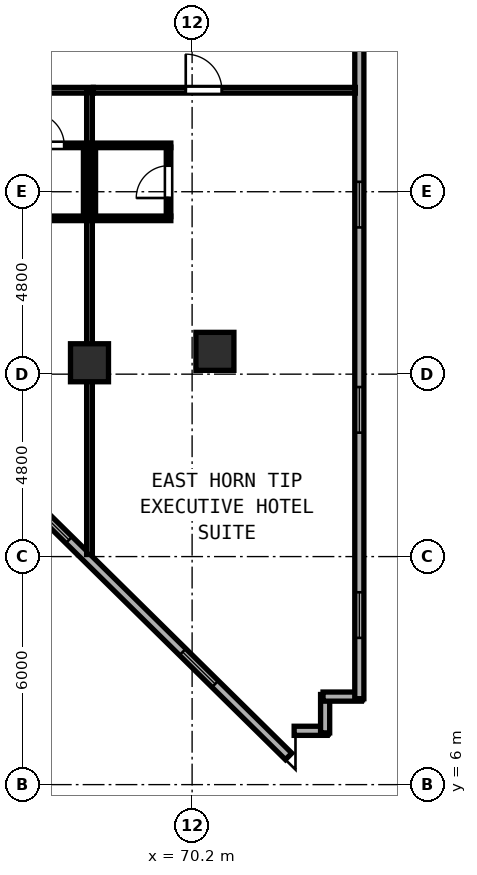
"""IFC4 building model, lengths in metres.
Left out: names, types, materials, properties, quantities, classifications, styles, units other than length and angle.
Written with IfcOpenShell. Run it as: python <this file> out.ifc"""

import sys

from ifc_helpers import new_model, si_unit, direction, frame, frame_2d, origin, origin_2d, place, context, subcontext, project, spatial, rectangle, hollow_rectangle, extrude, element, fill, save


model = new_model("IFC4")
c1 = context("Model", 3, precision=1e-05, world=origin(), true_north=direction((0.0, 1.0)))
c2 = subcontext(c1, "Body", "Model", "MODEL_VIEW")
j1 = project(units=[si_unit("LENGTHUNIT", "METRE"), si_unit("PLANEANGLEUNIT", "RADIAN")], contexts=[c1])
p1 = place(None, origin())
s1 = spatial("IfcSite", under=j1, at=p1, CompositionType="ELEMENT")
p2 = place(p1, origin())
s2 = spatial("IfcBuilding", under=s1, at=p2, CompositionType="ELEMENT")
p3 = place(p2, frame((0.0, 0.0, 47.6)))
s3 = spatial("IfcBuildingStorey", under=s2, at=p3, CompositionType="ELEMENT", Elevation=47.6)
for number, where, z_axis, x_axis in (
    (1, (70.8, 17.4, 0.0), (0.0, 0.0, 1.0), (1.0, 0.0, 0.0)),
    (2, (67.5, 17.1, 0.0), (0.0, 0.0, 1.0), (1.0, 0.0, 0.0)),
):
    element("IfcColumn", number, at=place(p3, frame(where, z_axis=z_axis, x_axis=x_axis)), inside=s3, PredefinedType="COLUMN", context=c2, shape_type="SweptSolid", body=[
        extrude(hollow_rectangle(XDim=1.0, YDim=1.0, WallThickness=0.038, at=origin_2d()), origin(), (0.0, 0.0, 1.0), 3.8),
    ])
p4 = place(p3, frame((64.966, 14.405, 0.0), z_axis=(0.0, 0.0, 1.0), x_axis=(0.71217720779, -0.701999732695, 0.0)))
e3 = element("IfcWall", 3, at=p4, inside=s3, PredefinedType="SOLIDWALL", context=c2, shape_type="SweptSolid", body=[
    extrude(rectangle(XDim=10.915, YDim=0.24, at=frame_2d((5.458, 0.0))), origin(), (0.0, 0.0, 1.0), 3.6),
])
p5 = place(p4, frame((1.6, 0.0, 0.85)))
e4 = element("IfcOpeningElement", 4, at=p5, cuts=e3, PredefinedType="OPENING", context=c2, shape_type="SweptSolid", body=[
    extrude(rectangle(XDim=1.2, YDim=1.85, at=frame_2d((0.6, 0.925))), frame((0.0, 0.13, 0.0), z_axis=(0.0, -1.0, 0.0), x_axis=(1.0, 0.0, 0.0)), (0.0, 0.0, 1.0), 0.26),
])
p6 = place(p4, frame((7.0, 0.0, 0.85)))
e5 = element("IfcOpeningElement", 5, at=p6, cuts=e3, PredefinedType="OPENING", context=c2, shape_type="SweptSolid", body=[
    extrude(rectangle(XDim=1.2, YDim=1.85, at=frame_2d((0.6, 0.925))), frame((0.0, 0.13, 0.0), z_axis=(0.0, -1.0, 0.0), x_axis=(1.0, 0.0, 0.0)), (0.0, 0.0, 1.0), 0.26),
])
p7 = place(p3, frame((72.885, 7.416, 0.0), z_axis=(0.0, 0.0, 1.0), x_axis=(1.0, 0.0, 0.0)))
e6 = element("IfcWall", 6, at=p7, inside=s3, PredefinedType="SOLIDWALL", context=c2, shape_type="SweptSolid", body=[
    extrude(rectangle(XDim=0.87, YDim=0.24, at=frame_2d((0.435, 0.0))), origin(), (0.0, 0.0, 1.0), 3.6),
])
for number, where, z_axis, x_axis in (
    (7, (73.7, 7.361, 0.0), (0.0, 0.0, 1.0), (0.0, 1.0, 0.0)),
    (8, (73.645, 8.316, 0.0), (0.0, 0.0, 1.0), (1.0, 0.0, 0.0)),
):
    element("IfcWall", number, at=place(p3, frame(where, z_axis=z_axis, x_axis=x_axis)), inside=s3, PredefinedType="SOLIDWALL", context=c2, shape_type="SweptSolid", body=[
        extrude(rectangle(XDim=1.01, YDim=0.24, at=frame_2d((0.505, 0.0))), origin(), (0.0, 0.0, 1.0), 3.6),
    ])
p8 = place(p3, frame((74.6, 8.261, 0.0), z_axis=(0.0, 0.0, 1.0), x_axis=(0.0, 1.0, 0.0)))
e9 = element("IfcWall", 9, at=p8, inside=s3, PredefinedType="SOLIDWALL", context=c2, shape_type="SweptSolid", body=[
    extrude(rectangle(XDim=20.547, YDim=0.24, at=frame_2d((10.274, 0.0))), origin(), (0.0, 0.0, 1.0), 3.6),
])
p9 = place(p8, frame((1.6, 0.0, 0.85)))
e10 = element("IfcOpeningElement", 10, at=p9, cuts=e9, PredefinedType="OPENING", context=c2, shape_type="SweptSolid", body=[
    extrude(rectangle(XDim=1.2, YDim=1.85, at=frame_2d((0.6, 0.925))), frame((0.0, 0.13, 0.0), z_axis=(0.0, -1.0, 0.0), x_axis=(1.0, 0.0, 0.0)), (0.0, 0.0, 1.0), 0.26),
])
p10 = place(p8, frame((7.0, 0.0, 0.85)))
e11 = element("IfcOpeningElement", 11, at=p10, cuts=e9, PredefinedType="OPENING", context=c2, shape_type="SweptSolid", body=[
    extrude(rectangle(XDim=1.2, YDim=1.85, at=frame_2d((0.6, 0.925))), frame((0.0, 0.13, 0.0), z_axis=(0.0, -1.0, 0.0), x_axis=(1.0, 0.0, 0.0)), (0.0, 0.0, 1.0), 0.26),
])
p11 = place(p8, frame((12.4, 0.0, 0.85)))
e12 = element("IfcOpeningElement", 12, at=p11, cuts=e9, PredefinedType="OPENING", context=c2, shape_type="SweptSolid", body=[
    extrude(rectangle(XDim=1.2, YDim=1.85, at=frame_2d((0.6, 0.925))), frame((0.0, 0.13, 0.0), z_axis=(0.0, -1.0, 0.0), x_axis=(1.0, 0.0, 0.0)), (0.0, 0.0, 1.0), 0.26),
])
p12 = place(p8, frame((17.8, 0.0, 0.85)))
e13 = element("IfcOpeningElement", 13, at=p12, cuts=e9, PredefinedType="OPENING", context=c2, shape_type="SweptSolid", body=[
    extrude(rectangle(XDim=1.2, YDim=1.85, at=frame_2d((0.6, 0.925))), frame((0.0, 0.13, 0.0), z_axis=(0.0, -1.0, 0.0), x_axis=(1.0, 0.0, 0.0)), (0.0, 0.0, 1.0), 0.26),
])
p13 = place(p3, frame((65.102, 24.27, 0.0), z_axis=(0.0, 0.0, 1.0), x_axis=(1.0, 0.0, 0.0)))
e14 = element("IfcWall", 14, at=p13, inside=s3, PredefinedType="PARTITIONING", context=c2, shape_type="SweptSolid", body=[
    extrude(rectangle(XDim=2.498, YDim=0.15, at=frame_2d((1.249, 0.0))), origin(), (0.0, 0.0, 1.0), 3.6),
])
p14 = place(p13, frame((1.312, 0.0, 0.0), z_axis=(0.0, 0.0, 1.0), x_axis=(-1.0, 0.0, 0.0)))
e15 = element("IfcOpeningElement", 15, at=p14, cuts=e14, PredefinedType="OPENING", context=c2, shape_type="SweptSolid", body=[
    extrude(rectangle(XDim=0.95, YDim=2.15, at=frame_2d((0.475, 1.075))), frame((0.0, 0.085, 0.0), z_axis=(0.0, -1.0, 0.0), x_axis=(1.0, 0.0, 0.0)), (0.0, 0.0, 1.0), 0.17),
])
p15 = place(p3, frame((67.5, 12.054, 0.0), z_axis=(0.0, 0.0, 1.0), x_axis=(0.0, 1.0, 0.0)))
e16 = element("IfcWall", 16, at=p15, inside=s3, PredefinedType="PARTITIONING", context=c2, shape_type="SweptSolid", body=[
    extrude(rectangle(XDim=12.156, YDim=0.15, at=frame_2d((6.078, 0.0))), origin(), (0.0, 0.0, 1.0), 3.6),
])
p16 = place(p3, frame((65.36, 22.82, 0.0), z_axis=(0.0, 0.0, 1.0), x_axis=(1.0, 0.0, 0.0)))
e17 = element("IfcWall", 17, at=p16, inside=s3, PredefinedType="PARTITIONING", context=c2, shape_type="SweptSolid", body=[
    extrude(rectangle(XDim=2.08, YDim=0.12, at=frame_2d((1.04, 0.0))), origin(), (0.0, 0.0, 1.0), 3.6),
])
p17 = place(p16, frame((1.475, 0.0, 0.0), z_axis=(0.0, 0.0, 1.0), x_axis=(-1.0, 0.0, 0.0)))
e18 = element("IfcOpeningElement", 18, at=p17, cuts=e17, PredefinedType="OPENING", context=c2, shape_type="SweptSolid", body=[
    extrude(rectangle(XDim=0.85, YDim=2.1, at=frame_2d((0.425, 1.05))), frame((0.0, 0.07, 0.0), z_axis=(0.0, -1.0, 0.0), x_axis=(1.0, 0.0, 0.0)), (0.0, 0.0, 1.0), 0.14),
])
p18 = place(p3, frame((65.36, 20.9, 0.0), z_axis=(0.0, 0.0, 1.0), x_axis=(1.0, 0.0, 0.0)))
e19 = element("IfcWall", 19, at=p18, inside=s3, PredefinedType="PARTITIONING", context=c2, shape_type="SweptSolid", body=[
    extrude(rectangle(XDim=2.08, YDim=0.12, at=frame_2d((1.04, 0.0))), origin(), (0.0, 0.0, 1.0), 3.6),
])
p19 = place(p3, frame((67.4, 20.945, 0.0), z_axis=(0.0, 0.0, 1.0), x_axis=(0.0, 1.0, 0.0)))
e20 = element("IfcWall", 20, at=p19, inside=s3, PredefinedType="PARTITIONING", context=c2, shape_type="SweptSolid", body=[
    extrude(rectangle(XDim=1.83, YDim=0.12, at=frame_2d((0.915, 0.0))), origin(), (0.0, 0.0, 1.0), 3.6),
])
p20 = place(p3, frame((67.602, 24.27, 0.0), z_axis=(0.0, 0.0, 1.0), x_axis=(1.0, 0.0, 0.0)))
e21 = element("IfcWall", 21, at=p20, inside=s3, PredefinedType="PARTITIONING", context=c2, shape_type="SweptSolid", body=[
    extrude(rectangle(XDim=6.893, YDim=0.15, at=frame_2d((3.447, 0.0))), origin(), (0.0, 0.0, 1.0), 3.6),
])
p21 = place(p20, frame((3.381, 0.0, 0.0), z_axis=(0.0, 0.0, 1.0), x_axis=(-1.0, 0.0, 0.0)))
e22 = element("IfcOpeningElement", 22, at=p21, cuts=e21, PredefinedType="OPENING", context=c2, shape_type="SweptSolid", body=[
    extrude(rectangle(XDim=0.95, YDim=2.18, at=frame_2d((0.475, 1.09))), frame((0.0, 0.085, 0.0), z_axis=(0.0, -1.0, 0.0), x_axis=(1.0, 0.0, 0.0)), (0.0, 0.0, 1.0), 0.17),
])
for number, where, z_axis, x_axis in (
    (23, (67.56, 22.82, 0.0), (0.0, 0.0, 1.0), (1.0, 0.0, 0.0)),
    (24, (67.56, 20.9, 0.0), (0.0, 0.0, 1.0), (1.0, 0.0, 0.0)),
):
    element("IfcWall", number, at=place(p3, frame(where, z_axis=z_axis, x_axis=x_axis)), inside=s3, PredefinedType="PARTITIONING", context=c2, shape_type="SweptSolid", body=[
        extrude(rectangle(XDim=2.08, YDim=0.12, at=frame_2d((1.04, 0.0))), origin(), (0.0, 0.0, 1.0), 3.6),
    ])
p22 = place(p3, frame((67.6, 20.945, 0.0), z_axis=(0.0, 0.0, 1.0), x_axis=(0.0, 1.0, 0.0)))
e25 = element("IfcWall", 25, at=p22, inside=s3, PredefinedType="PARTITIONING", context=c2, shape_type="SweptSolid", body=[
    extrude(rectangle(XDim=1.83, YDim=0.12, at=frame_2d((0.915, 0.0))), origin(), (0.0, 0.0, 1.0), 3.6),
])
p23 = place(p3, frame((69.58, 20.945, 0.0), z_axis=(0.0, 0.0, 1.0), x_axis=(0.0, 1.0, 0.0)))
e26 = element("IfcWall", 26, at=p23, inside=s3, PredefinedType="PARTITIONING", context=c2, shape_type="SweptSolid", body=[
    extrude(rectangle(XDim=1.83, YDim=0.12, at=frame_2d((0.915, 0.0))), origin(), (0.0, 0.0, 1.0), 3.6),
])
p24 = place(p23, frame((0.49, 0.0, 0.0)))
e27 = element("IfcOpeningElement", 27, at=p24, cuts=e26, PredefinedType="OPENING", context=c2, shape_type="SweptSolid", body=[
    extrude(rectangle(XDim=0.85, YDim=2.1, at=frame_2d((0.425, 1.05))), frame((0.0, 0.07, 0.0), z_axis=(0.0, -1.0, 0.0), x_axis=(1.0, 0.0, 0.0)), (0.0, 0.0, 1.0), 0.14),
])
p25 = place(p5, origin())
e28 = element("IfcWindow", 28, at=p25, inside=s3, PartitioningType="SINGLE_PANEL", PredefinedType="WINDOW", context=c2, shape_type="SweptSolid", body=[
    extrude(rectangle(XDim=1.2, YDim=1.85, at=frame_2d((0.6, 0.925))), frame((0.0, 0.03, 0.0), z_axis=(0.0, -1.0, 0.0), x_axis=(1.0, 0.0, 0.0)), (0.0, 0.0, 1.0), 0.06),
])
fill(e4, e28)
p26 = place(p6, origin())
e29 = element("IfcWindow", 29, at=p26, inside=s3, PartitioningType="SINGLE_PANEL", PredefinedType="WINDOW", context=c2, shape_type="SweptSolid", body=[
    extrude(rectangle(XDim=1.2, YDim=1.85, at=frame_2d((0.6, 0.925))), frame((0.0, 0.03, 0.0), z_axis=(0.0, -1.0, 0.0), x_axis=(1.0, 0.0, 0.0)), (0.0, 0.0, 1.0), 0.06),
])
fill(e5, e29)
p27 = place(p9, origin())
e30 = element("IfcWindow", 30, at=p27, inside=s3, PartitioningType="SINGLE_PANEL", PredefinedType="WINDOW", context=c2, shape_type="SweptSolid", body=[
    extrude(rectangle(XDim=1.2, YDim=1.85, at=frame_2d((0.6, 0.925))), frame((0.0, 0.03, 0.0), z_axis=(0.0, -1.0, 0.0), x_axis=(1.0, 0.0, 0.0)), (0.0, 0.0, 1.0), 0.06),
])
fill(e10, e30)
p28 = place(p10, origin())
e31 = element("IfcWindow", 31, at=p28, inside=s3, PartitioningType="SINGLE_PANEL", PredefinedType="WINDOW", context=c2, shape_type="SweptSolid", body=[
    extrude(rectangle(XDim=1.2, YDim=1.85, at=frame_2d((0.6, 0.925))), frame((0.0, 0.03, 0.0), z_axis=(0.0, -1.0, 0.0), x_axis=(1.0, 0.0, 0.0)), (0.0, 0.0, 1.0), 0.06),
])
fill(e11, e31)
p29 = place(p11, origin())
e32 = element("IfcWindow", 32, at=p29, inside=s3, PartitioningType="SINGLE_PANEL", PredefinedType="WINDOW", context=c2, shape_type="SweptSolid", body=[
    extrude(rectangle(XDim=1.2, YDim=1.85, at=frame_2d((0.6, 0.925))), frame((0.0, 0.03, 0.0), z_axis=(0.0, -1.0, 0.0), x_axis=(1.0, 0.0, 0.0)), (0.0, 0.0, 1.0), 0.06),
])
fill(e12, e32)
p30 = place(p17, origin())
e33 = element("IfcDoor", 33, at=p30, inside=s3, OperationType="SINGLE_SWING_RIGHT", PredefinedType="DOOR", context=c2, shape_type="SweptSolid", body=[
    extrude(rectangle(XDim=0.85, YDim=2.1, at=frame_2d((0.425, 1.05))), frame((0.0, 0.025, 0.0), z_axis=(0.0, -1.0, 0.0), x_axis=(1.0, 0.0, 0.0)), (0.0, 0.0, 1.0), 0.05),
])
fill(e18, e33)
p31 = place(p21, origin())
e34 = element("IfcDoor", 34, at=p31, inside=s3, OperationType="SINGLE_SWING_RIGHT", PredefinedType="DOOR", context=c2, shape_type="SweptSolid", body=[
    extrude(rectangle(XDim=0.95, YDim=2.18, at=frame_2d((0.475, 1.09))), frame((0.0, 0.025, 0.0), z_axis=(0.0, -1.0, 0.0), x_axis=(1.0, 0.0, 0.0)), (0.0, 0.0, 1.0), 0.05),
])
fill(e22, e34)
p32 = place(p24, origin())
e35 = element("IfcDoor", 35, at=p32, inside=s3, OperationType="SINGLE_SWING_LEFT", PredefinedType="DOOR", context=c2, shape_type="SweptSolid", body=[
    extrude(rectangle(XDim=0.85, YDim=2.1, at=frame_2d((0.425, 1.05))), frame((0.0, 0.025, 0.0), z_axis=(0.0, -1.0, 0.0), x_axis=(1.0, 0.0, 0.0)), (0.0, 0.0, 1.0), 0.05),
])
fill(e27, e35)
save(model, sys.argv[1])
